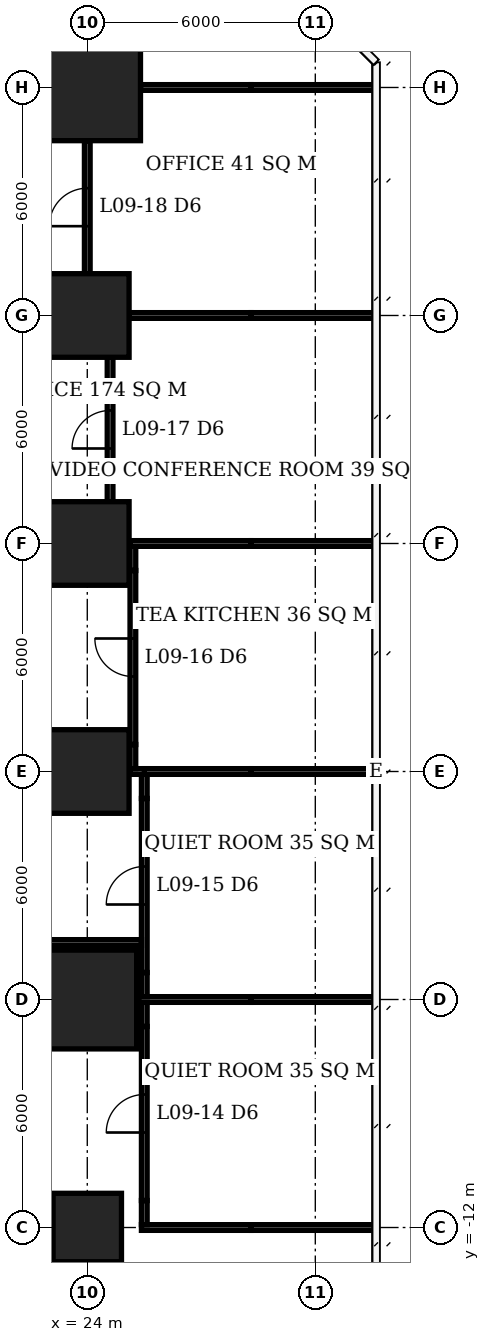
"""IFC4 building model, lengths in metres.
Left out: names, types, materials, properties, quantities, classifications, styles, units other than length and angle.
Written with IfcOpenShell. Run it as: python <this file> out.ifc"""

import sys

from ifc_helpers import new_model, si_unit, direction, frame, frame_2d, origin, origin_2d, place, context, subcontext, project, spatial, rectangle, extrude, element, fill, save


model = new_model("IFC4")
c1 = context("Model", 3, precision=1e-05, world=origin(), true_north=direction((0.0, 1.0)))
c2 = subcontext(c1, "Body", "Model", "MODEL_VIEW")
j1 = project(units=[si_unit("LENGTHUNIT", "METRE"), si_unit("PLANEANGLEUNIT", "RADIAN")], contexts=[c1])
p1 = place(None, origin())
s1 = spatial("IfcSite", under=j1, at=p1, CompositionType="ELEMENT")
p2 = place(p1, origin())
s2 = spatial("IfcBuilding", under=s1, at=p2, CompositionType="ELEMENT")
p3 = place(p2, frame((0.0, 0.0, 41.6)))
s3 = spatial("IfcBuildingStorey", under=s2, at=p3, CompositionType="ELEMENT", Elevation=41.6)
p4 = place(p3, frame((24.0, -12.0, 0.0), z_axis=(0.0, 0.0, 1.0), x_axis=(1.0, 0.0, 0.0)))
e1 = element("IfcColumn", 1, at=p4, inside=s3, PredefinedType="COLUMN", context=c2, shape_type="SweptSolid", body=[
    extrude(rectangle(XDim=1.8, YDim=1.8, at=origin_2d()), origin(), (0.0, 0.0, 1.0), 3.9),
])
p5 = place(p3, frame((24.0, -6.0, 0.0), z_axis=(0.0, 0.0, 1.0), x_axis=(1.0, 0.0, 0.0)))
e2 = element("IfcColumn", 2, at=p5, inside=s3, PredefinedType="COLUMN", context=c2, shape_type="SweptSolid", body=[
    extrude(rectangle(XDim=2.6, YDim=2.6, at=origin_2d()), origin(), (0.0, 0.0, 1.0), 3.9),
])
for number, where, z_axis, x_axis in (
    (3, (24.0, 0.0, 0.0), (0.0, 0.0, 1.0), (1.0, 0.0, 0.0)),
    (4, (24.0, 6.0, 0.0), (0.0, 0.0, 1.0), (1.0, 0.0, 0.0)),
    (5, (24.0, 12.0, 0.0), (0.0, 0.0, 1.0), (1.0, 0.0, 0.0)),
):
    element("IfcColumn", number, at=place(p3, frame(where, z_axis=z_axis, x_axis=x_axis)), inside=s3, PredefinedType="COLUMN", context=c2, shape_type="SweptSolid", body=[
        extrude(rectangle(XDim=2.2, YDim=2.2, at=origin_2d()), origin(), (0.0, 0.0, 1.0), 3.9),
    ])
p6 = place(p3, frame((24.0, 18.0, 0.0), z_axis=(0.0, 0.0, 1.0), x_axis=(1.0, 0.0, 0.0)))
e6 = element("IfcColumn", 6, at=p6, inside=s3, PredefinedType="COLUMN", context=c2, shape_type="SweptSolid", body=[
    extrude(rectangle(XDim=2.8, YDim=2.8, at=origin_2d()), origin(), (0.0, 0.0, 1.0), 3.9),
])
p7 = place(p3, frame((25.425, -12.0, 0.0), z_axis=(0.0, 0.0, 1.0), x_axis=(1.0, 0.0, 0.0)))
e7 = element("IfcWall", 7, at=p7, inside=s3, PredefinedType="PARTITIONING", context=c2, shape_type="SweptSolid", body=[
    extrude(rectangle(XDim=2.885, YDim=0.15, at=frame_2d((1.442, 0.0))), origin(), (0.0, 0.0, 1.0), 2.65),
])
p8 = place(p3, frame((28.31, -12.0, 0.0), z_axis=(0.0, 0.0, 1.0), x_axis=(1.0, 0.0, 0.0)))
e8 = element("IfcWall", 8, at=p8, inside=s3, PredefinedType="PARTITIONING", context=c2, shape_type="SweptSolid", body=[
    extrude(rectangle(XDim=3.29, YDim=0.15, at=frame_2d((1.645, 0.0))), origin(), (0.0, 0.0, 1.0), 3.65),
])
p9 = place(p3, frame((25.35, -6.0, 0.0), z_axis=(0.0, 0.0, 1.0), x_axis=(1.0, 0.0, 0.0)))
e9 = element("IfcWall", 9, at=p9, inside=s3, PredefinedType="PARTITIONING", context=c2, shape_type="SweptSolid", body=[
    extrude(rectangle(XDim=2.96, YDim=0.15, at=frame_2d((1.48, 0.0))), origin(), (0.0, 0.0, 1.0), 2.65),
])
p10 = place(p3, frame((28.31, -6.0, 0.0), z_axis=(0.0, 0.0, 1.0), x_axis=(1.0, 0.0, 0.0)))
e10 = element("IfcWall", 10, at=p10, inside=s3, PredefinedType="PARTITIONING", context=c2, shape_type="SweptSolid", body=[
    extrude(rectangle(XDim=3.29, YDim=0.15, at=frame_2d((1.645, 0.0))), origin(), (0.0, 0.0, 1.0), 3.65),
])
p11 = place(p3, frame((25.125, 0.0, 0.0), z_axis=(0.0, 0.0, 1.0), x_axis=(1.0, 0.0, 0.0)))
e11 = element("IfcWall", 11, at=p11, inside=s3, PredefinedType="PARTITIONING", context=c2, shape_type="SweptSolid", body=[
    extrude(rectangle(XDim=0.45, YDim=0.15, at=frame_2d((0.225, 0.0))), origin(), (0.0, 0.0, 1.0), 2.65),
])
p12 = place(p3, frame((25.5, 0.0, 0.0), z_axis=(0.0, 0.0, 1.0), x_axis=(1.0, 0.0, 0.0)))
e12 = element("IfcWall", 12, at=p12, inside=s3, PredefinedType="PARTITIONING", context=c2, shape_type="SweptSolid", body=[
    extrude(rectangle(XDim=2.81, YDim=0.15, at=frame_2d((1.405, 0.0))), origin(), (0.0, 0.0, 1.0), 2.65),
])
p13 = place(p3, frame((28.31, 0.0, 0.0), z_axis=(0.0, 0.0, 1.0), x_axis=(1.0, 0.0, 0.0)))
e13 = element("IfcWall", 13, at=p13, inside=s3, PredefinedType="PARTITIONING", context=c2, shape_type="SweptSolid", body=[
    extrude(rectangle(XDim=3.24, YDim=0.15, at=frame_2d((1.62, 0.0))), origin(), (0.0, 0.0, 1.0), 3.65),
])
p14 = place(p3, frame((25.125, 6.0, 0.0), z_axis=(0.0, 0.0, 1.0), x_axis=(1.0, 0.0, 0.0)))
e14 = element("IfcWall", 14, at=p14, inside=s3, PredefinedType="PARTITIONING", context=c2, shape_type="SweptSolid", body=[
    extrude(rectangle(XDim=3.185, YDim=0.15, at=frame_2d((1.593, 0.0))), origin(), (0.0, 0.0, 1.0), 2.65),
])
p15 = place(p3, frame((28.31, 6.0, 0.0), z_axis=(0.0, 0.0, 1.0), x_axis=(1.0, 0.0, 0.0)))
e15 = element("IfcWall", 15, at=p15, inside=s3, PredefinedType="PARTITIONING", context=c2, shape_type="SweptSolid", body=[
    extrude(rectangle(XDim=3.29, YDim=0.15, at=frame_2d((1.645, 0.0))), origin(), (0.0, 0.0, 1.0), 3.65),
])
p16 = place(p3, frame((25.1, 12.0, 0.0), z_axis=(0.0, 0.0, 1.0), x_axis=(1.0, 0.0, 0.0)))
e16 = element("IfcWall", 16, at=p16, inside=s3, PredefinedType="PARTITIONING", context=c2, shape_type="SweptSolid", body=[
    extrude(rectangle(XDim=3.21, YDim=0.15, at=frame_2d((1.605, 0.0))), origin(), (0.0, 0.0, 1.0), 2.65),
])
p17 = place(p3, frame((28.31, 12.0, 0.0), z_axis=(0.0, 0.0, 1.0), x_axis=(1.0, 0.0, 0.0)))
e17 = element("IfcWall", 17, at=p17, inside=s3, PredefinedType="PARTITIONING", context=c2, shape_type="SweptSolid", body=[
    extrude(rectangle(XDim=3.29, YDim=0.15, at=frame_2d((1.645, 0.0))), origin(), (0.0, 0.0, 1.0), 3.65),
])
p18 = place(p3, frame((25.4, 18.0, 0.0), z_axis=(0.0, 0.0, 1.0), x_axis=(1.0, 0.0, 0.0)))
e18 = element("IfcWall", 18, at=p18, inside=s3, PredefinedType="PARTITIONING", context=c2, shape_type="SweptSolid", body=[
    extrude(rectangle(XDim=2.91, YDim=0.15, at=frame_2d((1.455, 0.0))), origin(), (0.0, 0.0, 1.0), 2.65),
])
p19 = place(p3, frame((28.31, 18.0, 0.0), z_axis=(0.0, 0.0, 1.0), x_axis=(1.0, 0.0, 0.0)))
e19 = element("IfcWall", 19, at=p19, inside=s3, PredefinedType="PARTITIONING", context=c2, shape_type="SweptSolid", body=[
    extrude(rectangle(XDim=3.29, YDim=0.15, at=frame_2d((1.645, 0.0))), origin(), (0.0, 0.0, 1.0), 3.65),
])
p20 = place(p3, frame((24.0, 13.1, 0.0), z_axis=(0.0, 0.0, 1.0), x_axis=(0.0, 1.0, 0.0)))
e20 = element("IfcWall", 20, at=p20, inside=s3, PredefinedType="PARTITIONING", context=c2, shape_type="SweptSolid", body=[
    extrude(rectangle(XDim=3.5, YDim=0.15, at=frame_2d((1.75, 0.0))), origin(), (0.0, 0.0, 1.0), 3.65),
])
p21 = place(p20, frame((1.25, 0.0, 0.0)))
e21 = element("IfcOpeningElement", 21, at=p21, cuts=e20, PredefinedType="OPENING", context=c2, shape_type="SweptSolid", body=[
    extrude(rectangle(XDim=1.0, YDim=2.1, at=frame_2d((0.5, 1.05))), frame((0.0, 0.085, 0.0), z_axis=(0.0, -1.0, 0.0), x_axis=(1.0, 0.0, 0.0)), (0.0, 0.0, 1.0), 0.17),
])
p22 = place(p3, frame((24.6, 7.1, 0.0), z_axis=(0.0, 0.0, 1.0), x_axis=(0.0, 1.0, 0.0)))
e22 = element("IfcWall", 22, at=p22, inside=s3, PredefinedType="PARTITIONING", context=c2, shape_type="SweptSolid", body=[
    extrude(rectangle(XDim=3.8, YDim=0.15, at=frame_2d((1.9, 0.0))), origin(), (0.0, 0.0, 1.0), 3.65),
])
p23 = place(p22, frame((1.4, 0.0, 0.0)))
e23 = element("IfcOpeningElement", 23, at=p23, cuts=e22, PredefinedType="OPENING", context=c2, shape_type="SweptSolid", body=[
    extrude(rectangle(XDim=1.0, YDim=2.1, at=frame_2d((0.5, 1.05))), frame((0.0, 0.085, 0.0), z_axis=(0.0, -1.0, 0.0), x_axis=(1.0, 0.0, 0.0)), (0.0, 0.0, 1.0), 0.17),
])
p24 = place(p3, frame((25.2, 0.075, 0.0), z_axis=(0.0, 0.0, 1.0), x_axis=(0.0, 1.0, 0.0)))
e24 = element("IfcWall", 24, at=p24, inside=s3, PredefinedType="PARTITIONING", context=c2, shape_type="SweptSolid", body=[
    extrude(rectangle(XDim=0.635, YDim=0.15, at=frame_2d((0.317, 0.0))), origin(), (0.0, 0.0, 1.0), 2.65),
])
p25 = place(p3, frame((25.2, 0.71, 0.0), z_axis=(0.0, 0.0, 1.0), x_axis=(0.0, 1.0, 0.0)))
e25 = element("IfcWall", 25, at=p25, inside=s3, PredefinedType="PARTITIONING", context=c2, shape_type="SweptSolid", body=[
    extrude(rectangle(XDim=4.58, YDim=0.15, at=frame_2d((2.29, 0.0))), origin(), (0.0, 0.0, 1.0), 3.65),
])
p26 = place(p25, frame((1.79, 0.0, 0.0)))
e26 = element("IfcOpeningElement", 26, at=p26, cuts=e25, PredefinedType="OPENING", context=c2, shape_type="SweptSolid", body=[
    extrude(rectangle(XDim=1.0, YDim=2.1, at=frame_2d((0.5, 1.05))), frame((0.0, 0.085, 0.0), z_axis=(0.0, -1.0, 0.0), x_axis=(1.0, 0.0, 0.0)), (0.0, 0.0, 1.0), 0.17),
])
for number, where, z_axis, x_axis in (
    (27, (25.2, 5.29, 0.0), (0.0, 0.0, 1.0), (0.0, 1.0, 0.0)),
    (28, (25.5, -11.925, 0.0), (0.0, 0.0, 1.0), (0.0, 1.0, 0.0)),
):
    element("IfcWall", number, at=place(p3, frame(where, z_axis=z_axis, x_axis=x_axis)), inside=s3, PredefinedType="PARTITIONING", context=c2, shape_type="SweptSolid", body=[
        extrude(rectangle(XDim=0.635, YDim=0.15, at=frame_2d((0.317, 0.0))), origin(), (0.0, 0.0, 1.0), 2.65),
    ])
p27 = place(p3, frame((25.5, -11.29, 0.0), z_axis=(0.0, 0.0, 1.0), x_axis=(0.0, 1.0, 0.0)))
e29 = element("IfcWall", 29, at=p27, inside=s3, PredefinedType="PARTITIONING", context=c2, shape_type="SweptSolid", body=[
    extrude(rectangle(XDim=4.58, YDim=0.15, at=frame_2d((2.29, 0.0))), origin(), (0.0, 0.0, 1.0), 3.65),
])
p28 = place(p27, frame((1.79, 0.0, 0.0)))
e30 = element("IfcOpeningElement", 30, at=p28, cuts=e29, PredefinedType="OPENING", context=c2, shape_type="SweptSolid", body=[
    extrude(rectangle(XDim=1.0, YDim=2.1, at=frame_2d((0.5, 1.05))), frame((0.0, 0.085, 0.0), z_axis=(0.0, -1.0, 0.0), x_axis=(1.0, 0.0, 0.0)), (0.0, 0.0, 1.0), 0.17),
])
for number, where, z_axis, x_axis in (
    (31, (25.5, -6.71, 0.0), (0.0, 0.0, 1.0), (0.0, 1.0, 0.0)),
    (32, (25.5, -5.925, 0.0), (0.0, 0.0, 1.0), (0.0, 1.0, 0.0)),
):
    element("IfcWall", number, at=place(p3, frame(where, z_axis=z_axis, x_axis=x_axis)), inside=s3, PredefinedType="PARTITIONING", context=c2, shape_type="SweptSolid", body=[
        extrude(rectangle(XDim=0.635, YDim=0.15, at=frame_2d((0.317, 0.0))), origin(), (0.0, 0.0, 1.0), 2.65),
    ])
p29 = place(p3, frame((25.5, -5.29, 0.0), z_axis=(0.0, 0.0, 1.0), x_axis=(0.0, 1.0, 0.0)))
e33 = element("IfcWall", 33, at=p29, inside=s3, PredefinedType="PARTITIONING", context=c2, shape_type="SweptSolid", body=[
    extrude(rectangle(XDim=4.58, YDim=0.15, at=frame_2d((2.29, 0.0))), origin(), (0.0, 0.0, 1.0), 3.65),
])
p30 = place(p29, frame((1.79, 0.0, 0.0)))
e34 = element("IfcOpeningElement", 34, at=p30, cuts=e33, PredefinedType="OPENING", context=c2, shape_type="SweptSolid", body=[
    extrude(rectangle(XDim=1.0, YDim=2.1, at=frame_2d((0.5, 1.05))), frame((0.0, 0.085, 0.0), z_axis=(0.0, -1.0, 0.0), x_axis=(1.0, 0.0, 0.0)), (0.0, 0.0, 1.0), 0.17),
])
p31 = place(p3, frame((25.5, -0.71, 0.0), z_axis=(0.0, 0.0, 1.0), x_axis=(0.0, 1.0, 0.0)))
e35 = element("IfcWall", 35, at=p31, inside=s3, PredefinedType="PARTITIONING", context=c2, shape_type="SweptSolid", body=[
    extrude(rectangle(XDim=0.635, YDim=0.15, at=frame_2d((0.317, 0.0))), origin(), (0.0, 0.0, 1.0), 2.65),
])
p32 = place(p3, frame((20.35, -4.5, 0.0), z_axis=(0.0, 0.0, 1.0), x_axis=(1.0, 0.0, 0.0)))
e36 = element("IfcWall", 36, at=p32, inside=s3, PredefinedType="PARTITIONING", context=c2, shape_type="SweptSolid", body=[
    extrude(rectangle(XDim=5.075, YDim=0.15, at=frame_2d((2.538, 0.0))), origin(), (0.0, 0.0, 1.0), 3.65),
])
p33 = place(p28, origin())
e37 = element("IfcDoor", 37, at=p33, inside=s3, OperationType="SINGLE_SWING_LEFT", PredefinedType="DOOR", context=c2, shape_type="SweptSolid", body=[
    extrude(rectangle(XDim=1.0, YDim=2.1, at=frame_2d((0.5, 1.05))), frame((0.0, 0.025, 0.0), z_axis=(0.0, -1.0, 0.0), x_axis=(1.0, 0.0, 0.0)), (0.0, 0.0, 1.0), 0.05),
])
fill(e30, e37)
p34 = place(p30, origin())
e38 = element("IfcDoor", 38, at=p34, inside=s3, OperationType="SINGLE_SWING_LEFT", PredefinedType="DOOR", context=c2, shape_type="SweptSolid", body=[
    extrude(rectangle(XDim=1.0, YDim=2.1, at=frame_2d((0.5, 1.05))), frame((0.0, 0.025, 0.0), z_axis=(0.0, -1.0, 0.0), x_axis=(1.0, 0.0, 0.0)), (0.0, 0.0, 1.0), 0.05),
])
fill(e34, e38)
p35 = place(p26, origin())
e39 = element("IfcDoor", 39, at=p35, inside=s3, OperationType="SINGLE_SWING_RIGHT", PredefinedType="DOOR", context=c2, shape_type="SweptSolid", body=[
    extrude(rectangle(XDim=1.0, YDim=2.1, at=frame_2d((0.5, 1.05))), frame((0.0, 0.025, 0.0), z_axis=(0.0, -1.0, 0.0), x_axis=(1.0, 0.0, 0.0)), (0.0, 0.0, 1.0), 0.05),
])
fill(e26, e39)
p36 = place(p23, origin())
e40 = element("IfcDoor", 40, at=p36, inside=s3, OperationType="SINGLE_SWING_LEFT", PredefinedType="DOOR", context=c2, shape_type="SweptSolid", body=[
    extrude(rectangle(XDim=1.0, YDim=2.1, at=frame_2d((0.5, 1.05))), frame((0.0, 0.025, 0.0), z_axis=(0.0, -1.0, 0.0), x_axis=(1.0, 0.0, 0.0)), (0.0, 0.0, 1.0), 0.05),
])
fill(e23, e40)
p37 = place(p21, origin())
e41 = element("IfcDoor", 41, at=p37, inside=s3, OperationType="SINGLE_SWING_LEFT", PredefinedType="DOOR", context=c2, shape_type="SweptSolid", body=[
    extrude(rectangle(XDim=1.0, YDim=2.1, at=frame_2d((0.5, 1.05))), frame((0.0, 0.025, 0.0), z_axis=(0.0, -1.0, 0.0), x_axis=(1.0, 0.0, 0.0)), (0.0, 0.0, 1.0), 0.05),
])
fill(e21, e41)
save(model, sys.argv[1])
